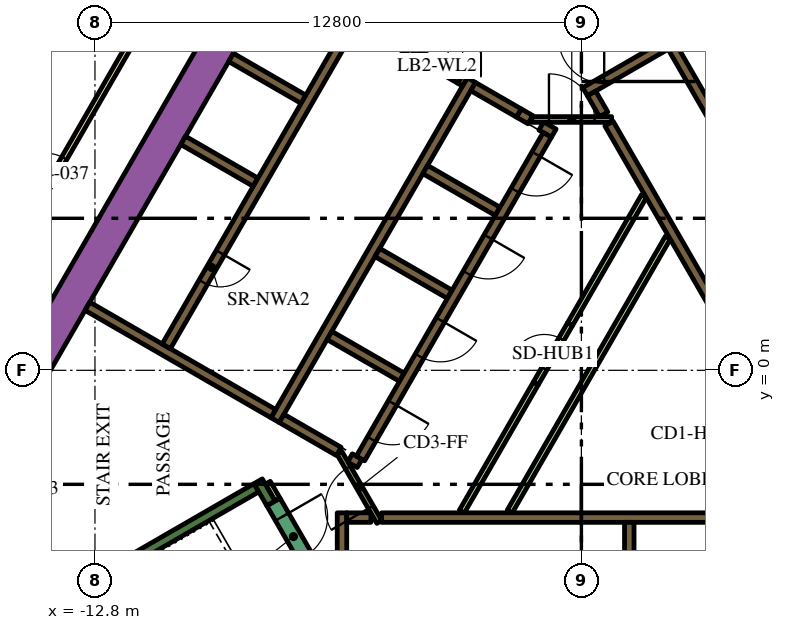
"""IFC4 building model, lengths in metres.
Left out: names, types, materials, properties, quantities, classifications, styles, units other than length and angle.
Written with IfcOpenShell. Run it as: python <this file> out.ifc"""

import sys

from ifc_helpers import new_model, si_unit, direction, frame, frame_2d, origin, place, context, subcontext, project, spatial, polyline, rectangle, outline, extrude, element, fill, save


model = new_model("IFC4")
c1 = context("Model", 3, precision=1e-05, world=origin(), true_north=direction((0.0, 1.0)))
c2 = subcontext(c1, "Body", "Model", "MODEL_VIEW")
j1 = project(units=[si_unit("LENGTHUNIT", "METRE"), si_unit("PLANEANGLEUNIT", "RADIAN")], contexts=[c1])
p1 = place(None, origin())
s1 = spatial("IfcSite", under=j1, at=p1, CompositionType="ELEMENT")
p2 = place(p1, origin())
s2 = spatial("IfcBuilding", under=s1, at=p2, CompositionType="ELEMENT")
p3 = place(p2, frame((0.0, 0.0, 70.5)))
s3 = spatial("IfcBuildingStorey", under=s2, at=p3, CompositionType="ELEMENT", Elevation=70.5)
p4 = place(p3, frame((-15.36, -1.503, 0.0), z_axis=(0.0, 0.0, 1.0), x_axis=(0.50000389221, 0.866023156604, 0.0)))
e1 = element("IfcWall", 1, at=p4, inside=s3, PredefinedType="SOLIDWALL", context=c2, shape_type="SweptSolid", body=[
    extrude(rectangle(XDim=21.0, YDim=0.9, at=frame_2d((10.5, 0.0))), origin(), (0.0, 0.0, 1.0), 3.9),
])
p5 = place(p3, frame((-12.134, -11.883, 0.0), z_axis=(0.0, 0.0, 1.0), x_axis=(-0.500005339912, 0.866022320763, 0.0)))
e2 = element("IfcWall", 2, at=p5, inside=s3, PredefinedType="SOLIDWALL", context=c2, shape_type="SweptSolid", body=[
    extrude(rectangle(XDim=9.488, YDim=0.9, at=frame_2d((4.744, 0.0))), origin(), (0.0, 0.0, 1.0), 3.9),
])
p6 = place(p3, frame((-14.44, -6.49, 0.0), z_axis=(0.0, 0.0, 1.0), x_axis=(0.866022966069, 0.500004222222, 0.0)))
e3 = element("IfcWall", 3, at=p6, inside=s3, PredefinedType="SOLIDWALL", context=c2, shape_type="SweptSolid", body=[
    extrude(rectangle(XDim=6.8, YDim=0.25, at=frame_2d((3.4, 0.0))), origin(), (0.0, 0.0, 1.0), 3.9),
])
p7 = place(p3, frame((-8.168, -3.503, 0.0), z_axis=(0.0, 0.0, 1.0), x_axis=(-0.499952099219, 0.866053057547, 0.0)))
e4 = element("IfcWall", 4, at=p7, inside=s3, PredefinedType="SOLIDWALL", context=c2, shape_type="SweptSolid", body=[
    extrude(rectangle(XDim=0.675, YDim=0.25, at=frame_2d((0.337, 0.0))), origin(), (0.0, 0.0, 1.0), 3.9),
])
p8 = place(p3, frame((-5.259, -3.875, 0.0), z_axis=(0.0, 0.0, 1.0), x_axis=(1.0, 0.0, 0.0)))
e5 = element("IfcWall", 5, at=p8, inside=s3, PredefinedType="SOLIDWALL", context=c2, shape_type="SweptSolid", body=[
    extrude(rectangle(XDim=10.489, YDim=0.25, at=frame_2d((5.244, 0.0))), origin(), (0.0, 0.0, 1.0), 3.9),
])
p9 = place(p3, frame((1.26, -4.0, 0.0), z_axis=(0.0, 0.0, 1.0), x_axis=(0.0, -1.0, 0.0)))
e6 = element("IfcWall", 6, at=p9, inside=s3, PredefinedType="SOLIDWALL", context=c2, shape_type="SweptSolid", body=[
    extrude(rectangle(XDim=2.2, YDim=0.25, at=frame_2d((1.1, 0.0))), origin(), (0.0, 0.0, 1.0), 3.9),
])
p10 = place(p3, frame((-6.3, -7.035, 0.0), z_axis=(0.0, 0.0, 1.0), x_axis=(0.0, 1.0, 0.0)))
e7 = element("IfcWall", 7, at=p10, inside=s3, PredefinedType="SOLIDWALL", context=c2, shape_type="SweptSolid", body=[
    extrude(rectangle(XDim=3.285, YDim=0.25, at=frame_2d((1.643, 0.0))), origin(), (0.0, 0.0, 1.0), 3.9),
])
p11 = place(p3, frame((-6.175, -3.875, 0.0), z_axis=(0.0, 0.0, 1.0), x_axis=(1.0, 0.0, 0.0)))
e8 = element("IfcWall", 8, at=p11, inside=s3, PredefinedType="SOLIDWALL", context=c2, shape_type="SweptSolid", body=[
    extrude(rectangle(XDim=0.637, YDim=0.25, at=frame_2d((0.318, 0.0))), origin(), (0.0, 0.0, 1.0), 3.9),
])
p12 = place(p3, frame((0.098, 7.331, 0.0), z_axis=(0.0, 0.0, 1.0), x_axis=(0.865988154826, 0.50006451154, 0.0)))
e9 = element("IfcWall", 9, at=p12, inside=s3, PredefinedType="SOLIDWALL", context=c2, shape_type="SweptSolid", body=[
    extrude(rectangle(XDim=3.398, YDim=0.25, at=frame_2d((1.699, 0.0))), origin(), (0.0, 0.0, 1.0), 3.9),
])
p13 = place(p3, frame((0.268, 7.285, 0.0), z_axis=(0.0, 0.0, 1.0), x_axis=(0.500098681536, -0.865968422476, 0.0)))
e10 = element("IfcWall", 10, at=p13, inside=s3, PredefinedType="SOLIDWALL", context=c2, shape_type="SweptSolid", body=[
    extrude(rectangle(XDim=0.636, YDim=0.25, at=frame_2d((0.318, 0.0))), origin(), (0.0, 0.0, 1.0), 3.9),
])
p14 = place(p3, frame((5.97, -2.591, 0.0), z_axis=(0.0, 0.0, 1.0), x_axis=(-0.499994469932, 0.866028596547, 0.0)))
e11 = element("IfcWall", 11, at=p14, inside=s3, PredefinedType="SOLIDWALL", context=c2, shape_type="SweptSolid", body=[
    extrude(rectangle(XDim=10.488, YDim=0.25, at=frame_2d((5.244, 0.0))), origin(), (0.0, 0.0, 1.0), 3.9),
])
p15 = place(p3, frame((-8.06, -1.311, 0.0), z_axis=(0.0, 0.0, 1.0), x_axis=(0.50000273126, 0.866023826885, 0.0)))
e12 = element("IfcWall", 12, at=p15, inside=s3, PredefinedType="SOLIDWALL", context=c2, shape_type="SweptSolid", body=[
    extrude(rectangle(XDim=10.33, YDim=0.25, at=frame_2d((5.165, 0.0))), origin(), (0.0, 0.0, 1.0), 3.9),
])
p16 = place(p3, frame((-1.342, 6.595, 0.0), z_axis=(0.0, 0.0, 1.0), x_axis=(-0.866046247233, 0.49996389635, 0.0)))
e13 = element("IfcWall", 13, at=p16, inside=s3, PredefinedType="SOLIDWALL", context=c2, shape_type="SweptSolid", body=[
    extrude(rectangle(XDim=0.35, YDim=0.25, at=frame_2d((0.175, 0.0))), origin(), (0.0, 0.0, 1.0), 3.9),
])
p17 = place(p3, frame((-1.647, 6.771, 0.0), z_axis=(0.0, 0.0, 1.0), x_axis=(-0.865971728693, 0.500092956464, 0.0)))
e14 = element("IfcWall", 14, at=p17, inside=s3, PredefinedType="SOLIDWALL", context=c2, shape_type="SweptSolid", body=[
    extrude(rectangle(XDim=1.388, YDim=0.25, at=frame_2d((0.694, 0.0))), origin(), (0.0, 0.0, 1.0), 3.9),
])
p18 = place(p3, frame((-0.728, 6.24, 0.0), z_axis=(0.0, 0.0, 1.0), x_axis=(-0.866088799389, 0.499890179513, 0.0)))
e15 = element("IfcWall", 15, at=p18, inside=s3, PredefinedType="SOLIDWALL", context=c2, shape_type="SweptSolid", body=[
    extrude(rectangle(XDim=0.378, YDim=0.25, at=frame_2d((0.189, 0.0))), origin(), (0.0, 0.0, 1.0), 3.9),
])
for number, where, z_axis, x_axis in (
    (16, (-2.204, 4.182, 0.0), (0.0, 0.0, 1.0), (-0.866, 0.5, 0.0)),
    (17, (-5.369, 3.1, 0.0), (0.0, 0.0, 1.0), (0.866, -0.5, 0.0)),
    (18, (-4.724, -0.182, 0.0), (0.0, 0.0, 1.0), (-0.866, 0.5, 0.0)),
):
    element("IfcWall", number, at=place(p3, frame(where, z_axis=z_axis, x_axis=x_axis)), inside=s3, PredefinedType="SOLIDWALL", context=c2, shape_type="SweptSolid", body=[
        extrude(rectangle(XDim=2.2, YDim=0.25, at=frame_2d((1.1, 0.0))), origin(), (0.0, 0.0, 1.0), 3.9),
    ])
p19 = place(p3, frame((-6.088, -2.305, 0.0), z_axis=(0.0, 0.0, 1.0), x_axis=(0.866059450854, -0.499941024108, 0.0)))
e19 = element("IfcWall", 19, at=p19, inside=s3, PredefinedType="SOLIDWALL", context=c2, shape_type="SweptSolid", body=[
    extrude(rectangle(XDim=0.29, YDim=0.25, at=frame_2d((0.145, 0.0))), origin(), (0.0, 0.0, 1.0), 3.9),
])
p20 = place(p3, frame((-7.889, -1.265, 0.0), z_axis=(0.0, 0.0, 1.0), x_axis=(0.865986741702, -0.500066958712, 0.0)))
e20 = element("IfcWall", 20, at=p20, inside=s3, PredefinedType="SOLIDWALL", context=c2, shape_type="SweptSolid", body=[
    extrude(rectangle(XDim=1.738, YDim=0.25, at=frame_2d((0.869, 0.0))), origin(), (0.0, 0.0, 1.0), 3.9),
])
p21 = place(p3, frame((-8.106, -1.14, 0.0), z_axis=(0.0, 0.0, 1.0), x_axis=(-0.866000643155, 0.500042884217, 0.0)))
e21 = element("IfcWall", 21, at=p21, inside=s3, PredefinedType="SOLIDWALL", context=c2, shape_type="SweptSolid", body=[
    extrude(rectangle(XDim=5.65, YDim=0.25, at=frame_2d((2.825, 0.0))), origin(), (0.0, 0.0, 1.0), 3.9),
])
p22 = place(p3, origin())
e22 = element("IfcWall", 22, at=p22, inside=s3, PredefinedType="SOLIDWALL", context=c2, shape_type="SweptSolid", body=[
    extrude(outline(polyline([(-3.128, 7.481), (-3.259, 7.557), (-3.134, 7.773), (-3.003, 7.698), (-3.128, 7.481)])), origin(), (0.0, 0.0, 1.0), 3.9),
])
for number, where, z_axis, x_axis in (
    (23, (-8.574, 4.95, 0.0), (0.0, 0.0, 1.0), (-0.866, 0.5, 0.0)),
    (24, (-7.314, 7.132, 0.0), (0.0, 0.0, 1.0), (-0.866, 0.5, 0.0)),
):
    element("IfcWall", number, at=place(p3, frame(where, z_axis=z_axis, x_axis=x_axis)), inside=s3, PredefinedType="SOLIDWALL", context=c2, shape_type="SweptSolid", body=[
        extrude(rectangle(XDim=2.2, YDim=0.25, at=frame_2d((1.1, 0.0))), origin(), (0.0, 0.0, 1.0), 3.9),
    ])
p23 = place(p3, frame((-7.959, 10.415, 0.0), z_axis=(0.0, 0.0, 1.0), x_axis=(0.866020958405, -0.500007699544, 0.0)))
e25 = element("IfcWall", 25, at=p23, inside=s3, PredefinedType="SOLIDWALL", context=c2, shape_type="SweptSolid", body=[
    extrude(rectangle(XDim=4.1, YDim=0.25, at=frame_2d((2.05, 0.0))), origin(), (0.0, 0.0, 1.0), 3.9),
])
p24 = place(p3, frame((-8.252, -2.958, 0.0), z_axis=(0.0, 0.0, 1.0), x_axis=(0.500174715838, -0.865924508047, 0.0)))
e26 = element("IfcWall", 26, at=p24, inside=s3, PredefinedType="PARTITIONING", context=c2, shape_type="SweptSolid", body=[
    extrude(rectangle(XDim=0.514, YDim=0.15, at=frame_2d((0.257, 0.0))), origin(), (0.0, 0.0, 1.0), 2.75),
])
p25 = place(p3, frame((-3.147, -3.718, 0.0), z_axis=(0.0, 0.0, 1.0), x_axis=(0.500010131483, 0.866019554291, 0.0)))
e27 = element("IfcWall", 27, at=p25, inside=s3, PredefinedType="PARTITIONING", context=c2, shape_type="SweptSolid", body=[
    extrude(rectangle(XDim=3.894, YDim=0.15, at=frame_2d((1.947, 0.0))), origin(), (0.0, 0.0, 1.0), 2.75),
])
p26 = place(p3, frame((-1.887, -3.718, 0.0), z_axis=(0.0, 0.0, 1.0), x_axis=(0.500005008002, 0.866022512394, 0.0)))
e28 = element("IfcWall", 28, at=p26, inside=s3, PredefinedType="PARTITIONING", context=c2, shape_type="SweptSolid", body=[
    extrude(rectangle(XDim=8.327, YDim=0.15, at=frame_2d((4.164, 0.0))), origin(), (0.0, 0.0, 1.0), 2.75),
])
p27 = place(p3, frame((-0.3, 1.212, 0.0), z_axis=(0.0, 0.0, 1.0), x_axis=(0.499963101113, 0.866046706318, 0.0)))
e29 = element("IfcWall", 29, at=p27, inside=s3, PredefinedType="PARTITIONING", context=c2, shape_type="SweptSolid", body=[
    extrude(rectangle(XDim=3.893, YDim=0.15, at=frame_2d((1.947, 0.0))), origin(), (0.0, 0.0, 1.0), 2.75),
])
p28 = place(p3, frame((8.565, -2.185, 0.0), z_axis=(0.0, 0.0, 1.0), x_axis=(-0.499997954832, 0.866026584559, 0.0)))
e30 = element("IfcWall", 30, at=p28, inside=s3, PredefinedType="SOLIDWALL", context=c2, shape_type="SweptSolid", body=[
    extrude(rectangle(XDim=12.35, YDim=0.25, at=frame_2d((6.175, 0.0))), origin(), (0.0, 0.0, 1.0), 3.9),
])
p29 = place(p28, frame((5.725, 0.0, 0.0)))
e31 = element("IfcOpeningElement", 31, at=p29, cuts=e30, PredefinedType="OPENING", context=c2, shape_type="SweptSolid", body=[
    extrude(rectangle(XDim=0.9, YDim=2.1, at=frame_2d((0.45, 1.05))), frame((0.0, 0.135, 0.0), z_axis=(0.0, -1.0, 0.0), x_axis=(1.0, 0.0, 0.0)), (0.0, 0.0, 1.0), 0.27),
])
p30 = place(p3, frame((-6.008, 9.144, 0.0), z_axis=(0.0, 0.0, 1.0), x_axis=(-0.500006956611, -0.866021387346, 0.0)))
e32 = element("IfcWall", 32, at=p30, inside=s3, PredefinedType="SOLIDWALL", context=c2, shape_type="SweptSolid", body=[
    extrude(rectangle(XDim=9.83, YDim=0.25, at=frame_2d((4.915, 0.0))), origin(), (0.0, 0.0, 1.0), 3.9),
])
p31 = place(p30, frame((6.985, 0.0, 0.0)))
e33 = element("IfcOpeningElement", 33, at=p31, cuts=e32, PredefinedType="OPENING", context=c2, shape_type="SweptSolid", body=[
    extrude(rectangle(XDim=0.9, YDim=2.1, at=frame_2d((0.45, 1.05))), frame((0.0, 0.135, 0.0), z_axis=(0.0, -1.0, 0.0), x_axis=(1.0, 0.0, 0.0)), (0.0, 0.0, 1.0), 0.27),
])
p32 = place(p3, frame((-0.898, 6.194, 0.0), z_axis=(0.0, 0.0, 1.0), x_axis=(-0.499996202215, -0.866027596426, 0.0)))
e34 = element("IfcWall", 34, at=p32, inside=s3, PredefinedType="SOLIDWALL", context=c2, shape_type="SweptSolid", body=[
    extrude(rectangle(XDim=9.83, YDim=0.25, at=frame_2d((4.915, 0.0))), origin(), (0.0, 0.0, 1.0), 3.9),
])
p33 = place(p32, frame((0.585, 0.0, 0.0)))
e35 = element("IfcOpeningElement", 35, at=p33, cuts=e34, PredefinedType="OPENING", context=c2, shape_type="SweptSolid", body=[
    extrude(rectangle(XDim=1.1, YDim=2.1, at=frame_2d((0.55, 1.05))), frame((0.0, 0.135, 0.0), z_axis=(0.0, -1.0, 0.0), x_axis=(1.0, 0.0, 0.0)), (0.0, 0.0, 1.0), 0.27),
])
p34 = place(p32, frame((3.105, 0.0, 0.0)))
e36 = element("IfcOpeningElement", 36, at=p34, cuts=e34, PredefinedType="OPENING", context=c2, shape_type="SweptSolid", body=[
    extrude(rectangle(XDim=1.1, YDim=2.1, at=frame_2d((0.55, 1.05))), frame((0.0, 0.135, 0.0), z_axis=(0.0, -1.0, 0.0), x_axis=(1.0, 0.0, 0.0)), (0.0, 0.0, 1.0), 0.27),
])
p35 = place(p32, frame((5.625, 0.0, 0.0)))
e37 = element("IfcOpeningElement", 37, at=p35, cuts=e34, PredefinedType="OPENING", context=c2, shape_type="SweptSolid", body=[
    extrude(rectangle(XDim=1.1, YDim=2.1, at=frame_2d((0.55, 1.05))), frame((0.0, 0.135, 0.0), z_axis=(0.0, -1.0, 0.0), x_axis=(1.0, 0.0, 0.0)), (0.0, 0.0, 1.0), 0.27),
])
p36 = place(p32, frame((8.145, 0.0, 0.0)))
e38 = element("IfcOpeningElement", 38, at=p36, cuts=e34, PredefinedType="OPENING", context=c2, shape_type="SweptSolid", body=[
    extrude(rectangle(XDim=1.1, YDim=2.1, at=frame_2d((0.55, 1.05))), frame((0.0, 0.135, 0.0), z_axis=(0.0, -1.0, 0.0), x_axis=(1.0, 0.0, 0.0)), (0.0, 0.0, 1.0), 0.27),
])
p37 = place(p3, frame((-8.103, -3.466, 0.0), z_axis=(0.0, 0.0, 1.0), x_axis=(0.500078061341, -0.865980330357, 0.0)))
e39 = element("IfcWall", 39, at=p37, inside=s3, PredefinedType="SOLIDWALL", context=c2, shape_type="SweptSolid", body=[
    extrude(rectangle(XDim=2.1, YDim=0.4, at=frame_2d((1.05, 0.0))), origin(), (0.0, 0.0, 1.0), 3.9),
])
p38 = place(p37, frame((0.45, 0.0, 0.0)))
e40 = element("IfcOpeningElement", 40, at=p38, cuts=e39, PredefinedType="OPENING", context=c2, shape_type="SweptSolid", body=[
    extrude(rectangle(XDim=1.2, YDim=2.1, at=frame_2d((0.6, 1.05))), frame((0.0, 0.21, 0.0), z_axis=(0.0, -1.0, 0.0), x_axis=(1.0, 0.0, 0.0)), (0.0, 0.0, 1.0), 0.42),
])
p39 = place(p3, frame((-1.303, 6.6, 0.0), z_axis=(0.0, 0.0, 1.0), x_axis=(1.0, 0.0, 0.0)))
e41 = element("IfcWall", 41, at=p39, inside=s3, PredefinedType="PARTITIONING", context=c2, shape_type="SweptSolid", body=[
    extrude(rectangle(XDim=2.1, YDim=0.15, at=frame_2d((1.05, 0.0))), origin(), (0.0, 0.0, 1.0), 3.9),
])
p40 = place(p39, frame((0.45, 0.0, 0.0)))
e42 = element("IfcOpeningElement", 42, at=p40, cuts=e41, PredefinedType="OPENING", context=c2, shape_type="SweptSolid", body=[
    extrude(rectangle(XDim=1.2, YDim=2.1, at=frame_2d((0.6, 1.05))), frame((0.0, 0.085, 0.0), z_axis=(0.0, -1.0, 0.0), x_axis=(1.0, 0.0, 0.0)), (0.0, 0.0, 1.0), 0.17),
])
p41 = place(p3, frame((-5.317, -3.99, 0.0), z_axis=(0.0, 0.0, 1.0), x_axis=(-0.500027713859, 0.866009402589, 0.0)))
e43 = element("IfcWall", 43, at=p41, inside=s3, PredefinedType="PARTITIONING", context=c2, shape_type="SweptSolid", body=[
    extrude(rectangle(XDim=2.1, YDim=0.15, at=frame_2d((1.05, 0.0))), origin(), (0.0, 0.0, 1.0), 3.9),
])
p42 = place(p41, frame((0.45, 0.0, 0.0)))
e44 = element("IfcOpeningElement", 44, at=p42, cuts=e43, PredefinedType="OPENING", context=c2, shape_type="SweptSolid", body=[
    extrude(rectangle(XDim=1.2, YDim=2.1, at=frame_2d((0.6, 1.05))), frame((0.0, 0.085, 0.0), z_axis=(0.0, -1.0, 0.0), x_axis=(1.0, 0.0, 0.0)), (0.0, 0.0, 1.0), 0.17),
])
p43 = place(p3, frame((-4.409, 8.365, 0.0), z_axis=(0.0, 0.0, 1.0), x_axis=(0.866034573852, -0.49998411664, 0.0)))
e45 = element("IfcWall", 45, at=p43, inside=s3, PredefinedType="SOLIDWALL", context=c2, shape_type="SweptSolid", body=[
    extrude(rectangle(XDim=1.4, YDim=0.25, at=frame_2d((0.7, 0.0))), origin(), (0.0, 0.0, 1.0), 3.9),
])
p44 = place(p43, frame((0.1, 0.0, 0.0)))
e46 = element("IfcOpeningElement", 46, at=p44, cuts=e45, PredefinedType="OPENING", context=c2, shape_type="SweptSolid", body=[
    extrude(rectangle(XDim=1.2, YDim=2.1, at=frame_2d((0.6, 1.05))), frame((0.0, 0.135, 0.0), z_axis=(0.0, -1.0, 0.0), x_axis=(1.0, 0.0, 0.0)), (0.0, 0.0, 1.0), 0.27),
])
p45 = place(p3, frame((-1.2, -0.346, 0.0), z_axis=(0.0, 0.0, 1.0), x_axis=(0.499961193289, 0.866047807691, 0.0)))
e47 = element("IfcWall", 47, at=p45, inside=s3, PredefinedType="PARTITIONING", context=c2, shape_type="SweptSolid", body=[
    extrude(rectangle(XDim=1.8, YDim=0.15, at=frame_2d((0.9, 0.0))), origin(), (0.0, 0.0, 1.0), 2.75),
])
p46 = place(p45, frame((0.45, 0.0, 0.0)))
e48 = element("IfcOpeningElement", 48, at=p46, cuts=e47, PredefinedType="OPENING", context=c2, shape_type="SweptSolid", body=[
    extrude(rectangle(XDim=0.9, YDim=2.1, at=frame_2d((0.45, 1.05))), frame((0.0, 0.085, 0.0), z_axis=(0.0, -1.0, 0.0), x_axis=(1.0, 0.0, 0.0)), (0.0, 0.0, 1.0), 0.17),
])
p47 = place(p3, frame((-19.081, -3.9, 0.0), z_axis=(0.0, 0.0, 1.0), x_axis=(0.499998313975, 0.866026377209, 0.0)))
e49 = element("IfcWall", 49, at=p47, inside=s3, PredefinedType="PARTITIONING", context=c2, shape_type="SweptSolid", body=[
    extrude(rectangle(XDim=25.766, YDim=0.15, at=frame_2d((12.883, 0.0))), origin(), (0.0, 0.0, 1.0), 2.75),
])
p48 = place(p47, frame((24.586, 0.0, 0.0)))
e50 = element("IfcOpeningElement", 50, at=p48, cuts=e49, PredefinedType="OPENING", context=c2, shape_type="SweptSolid", body=[
    extrude(rectangle(XDim=1.0, YDim=2.1, at=frame_2d((0.5, 1.05))), frame((0.0, 0.085, 0.0), z_axis=(0.0, -1.0, 0.0), x_axis=(1.0, 0.0, 0.0)), (0.0, 0.0, 1.0), 0.17),
])
p49 = place(p47, frame((9.948, 0.0, 0.0)))
e51 = element("IfcOpeningElement", 51, at=p49, cuts=e49, PredefinedType="OPENING", context=c2, shape_type="SweptSolid", body=[
    extrude(rectangle(XDim=1.0, YDim=2.1, at=frame_2d((0.5, 1.05))), frame((0.0, 0.085, 0.0), z_axis=(0.0, -1.0, 0.0), x_axis=(1.0, 0.0, 0.0)), (0.0, 0.0, 1.0), 0.17),
])
p50 = place(p47, frame((7.782, 0.0, 0.0)))
e52 = element("IfcOpeningElement", 52, at=p50, cuts=e49, PredefinedType="OPENING", context=c2, shape_type="SweptSolid", body=[
    extrude(rectangle(XDim=0.9, YDim=2.1, at=frame_2d((0.45, 1.05))), frame((0.0, 0.085, 0.0), z_axis=(0.0, -1.0, 0.0), x_axis=(1.0, 0.0, 0.0)), (0.0, 0.0, 1.0), 0.17),
])
p51 = place(p47, frame((4.658, 0.0, 0.0)))
e53 = element("IfcOpeningElement", 53, at=p51, cuts=e49, PredefinedType="OPENING", context=c2, shape_type="SweptSolid", body=[
    extrude(rectangle(XDim=0.9, YDim=2.1, at=frame_2d((0.45, 1.05))), frame((0.0, 0.085, 0.0), z_axis=(0.0, -1.0, 0.0), x_axis=(1.0, 0.0, 0.0)), (0.0, 0.0, 1.0), 0.17),
])
p52 = place(p31, origin())
e54 = element("IfcDoor", 54, at=p52, inside=s3, OperationType="SINGLE_SWING_LEFT", PredefinedType="DOOR", context=c2, shape_type="SweptSolid", body=[
    extrude(rectangle(XDim=0.9, YDim=2.1, at=frame_2d((0.45, 1.05))), frame((0.0, 0.025, 0.0), z_axis=(0.0, -1.0, 0.0), x_axis=(1.0, 0.0, 0.0)), (0.0, 0.0, 1.0), 0.05),
])
fill(e33, e54)
p53 = place(p33, origin())
e55 = element("IfcDoor", 55, at=p53, inside=s3, OperationType="DOUBLE_DOOR_SLIDING", PredefinedType="DOOR", context=c2, shape_type="SweptSolid", body=[
    extrude(rectangle(XDim=1.1, YDim=2.1, at=frame_2d((0.55, 1.05))), frame((0.0, 0.025, 0.0), z_axis=(0.0, -1.0, 0.0), x_axis=(1.0, 0.0, 0.0)), (0.0, 0.0, 1.0), 0.05),
])
fill(e35, e55)
p54 = place(p34, origin())
e56 = element("IfcDoor", 56, at=p54, inside=s3, OperationType="DOUBLE_DOOR_SLIDING", PredefinedType="DOOR", context=c2, shape_type="SweptSolid", body=[
    extrude(rectangle(XDim=1.1, YDim=2.1, at=frame_2d((0.55, 1.05))), frame((0.0, 0.025, 0.0), z_axis=(0.0, -1.0, 0.0), x_axis=(1.0, 0.0, 0.0)), (0.0, 0.0, 1.0), 0.05),
])
fill(e36, e56)
p55 = place(p35, origin())
e57 = element("IfcDoor", 57, at=p55, inside=s3, OperationType="DOUBLE_DOOR_SLIDING", PredefinedType="DOOR", context=c2, shape_type="SweptSolid", body=[
    extrude(rectangle(XDim=1.1, YDim=2.1, at=frame_2d((0.55, 1.05))), frame((0.0, 0.025, 0.0), z_axis=(0.0, -1.0, 0.0), x_axis=(1.0, 0.0, 0.0)), (0.0, 0.0, 1.0), 0.05),
])
fill(e37, e57)
p56 = place(p36, origin())
e58 = element("IfcDoor", 58, at=p56, inside=s3, OperationType="DOUBLE_DOOR_SLIDING", PredefinedType="DOOR", context=c2, shape_type="SweptSolid", body=[
    extrude(rectangle(XDim=1.1, YDim=2.1, at=frame_2d((0.55, 1.05))), frame((0.0, 0.025, 0.0), z_axis=(0.0, -1.0, 0.0), x_axis=(1.0, 0.0, 0.0)), (0.0, 0.0, 1.0), 0.05),
])
fill(e38, e58)
p57 = place(p38, origin())
e59 = element("IfcDoor", 59, at=p57, inside=s3, OperationType="SINGLE_SWING_LEFT", PredefinedType="DOOR", context=c2, shape_type="SweptSolid", body=[
    extrude(rectangle(XDim=1.2, YDim=2.1, at=frame_2d((0.6, 1.05))), frame((0.0, 0.025, 0.0), z_axis=(0.0, -1.0, 0.0), x_axis=(1.0, 0.0, 0.0)), (0.0, 0.0, 1.0), 0.05),
])
fill(e40, e59)
p58 = place(p40, origin())
e60 = element("IfcDoor", 60, at=p58, inside=s3, OperationType="SINGLE_SWING_LEFT", PredefinedType="DOOR", context=c2, shape_type="SweptSolid", body=[
    extrude(rectangle(XDim=1.2, YDim=2.1, at=frame_2d((0.6, 1.05))), frame((0.0, 0.025, 0.0), z_axis=(0.0, -1.0, 0.0), x_axis=(1.0, 0.0, 0.0)), (0.0, 0.0, 1.0), 0.05),
])
fill(e42, e60)
p59 = place(p42, origin())
e61 = element("IfcDoor", 61, at=p59, inside=s3, OperationType="SINGLE_SWING_LEFT", PredefinedType="DOOR", context=c2, shape_type="SweptSolid", body=[
    extrude(rectangle(XDim=1.2, YDim=2.1, at=frame_2d((0.6, 1.05))), frame((0.0, 0.025, 0.0), z_axis=(0.0, -1.0, 0.0), x_axis=(1.0, 0.0, 0.0)), (0.0, 0.0, 1.0), 0.05),
])
fill(e44, e61)
p60 = place(p44, origin())
e62 = element("IfcDoor", 62, at=p60, inside=s3, OperationType="SINGLE_SWING_LEFT", PredefinedType="DOOR", context=c2, shape_type="SweptSolid", body=[
    extrude(rectangle(XDim=1.2, YDim=2.1, at=frame_2d((0.6, 1.05))), frame((0.0, 0.025, 0.0), z_axis=(0.0, -1.0, 0.0), x_axis=(1.0, 0.0, 0.0)), (0.0, 0.0, 1.0), 0.05),
])
fill(e46, e62)
p61 = place(p46, origin())
e63 = element("IfcDoor", 63, at=p61, inside=s3, OperationType="SINGLE_SWING_LEFT", PredefinedType="DOOR", context=c2, shape_type="SweptSolid", body=[
    extrude(rectangle(XDim=0.9, YDim=2.1, at=frame_2d((0.45, 1.05))), frame((0.0, 0.025, 0.0), z_axis=(0.0, -1.0, 0.0), x_axis=(1.0, 0.0, 0.0)), (0.0, 0.0, 1.0), 0.05),
])
fill(e48, e63)
p62 = place(p49, origin())
e64 = element("IfcDoor", 64, at=p62, inside=s3, OperationType="SINGLE_SWING_LEFT", PredefinedType="DOOR", context=c2, shape_type="SweptSolid", body=[
    extrude(rectangle(XDim=1.0, YDim=2.1, at=frame_2d((0.5, 1.05))), frame((0.0, 0.025, 0.0), z_axis=(0.0, -1.0, 0.0), x_axis=(1.0, 0.0, 0.0)), (0.0, 0.0, 1.0), 0.05),
])
fill(e51, e64)
save(model, sys.argv[1])
